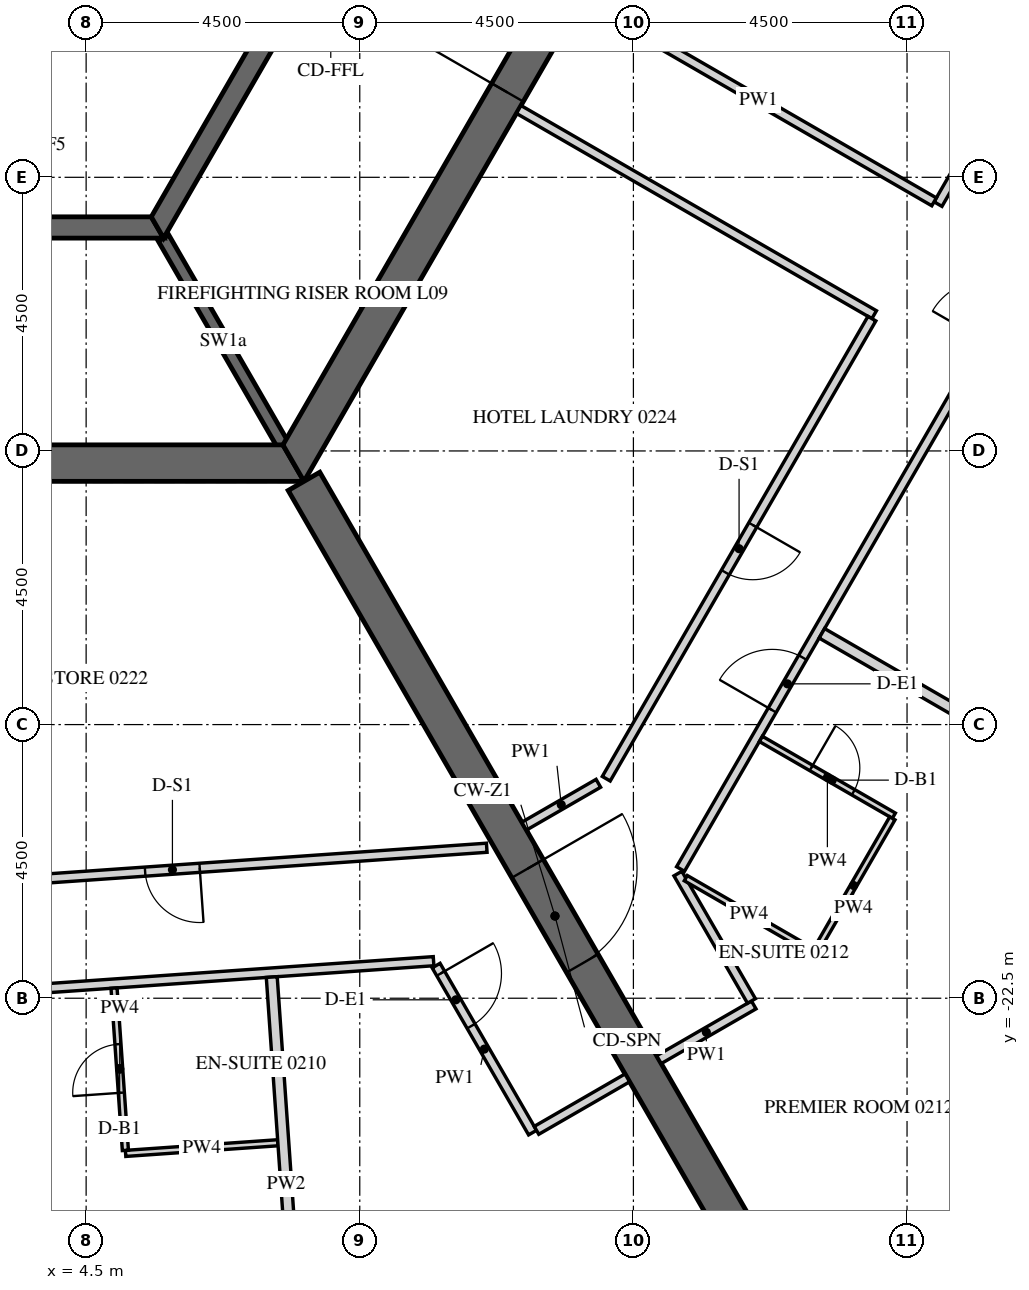
"""IFC4 building model, lengths in metres.
Left out: names, types, materials, properties, quantities, classifications, styles, units other than length and angle.
Written with IfcOpenShell. Run it as: python <this file> out.ifc"""

import sys

from ifc_helpers import new_model, si_unit, direction, frame, frame_2d, origin, place, context, subcontext, project, spatial, polyline, rectangle, outline, extrude, element, fill, save


model = new_model("IFC4")
c1 = context("Model", 3, precision=1e-05, world=origin(), true_north=direction((0.0, 1.0)))
c2 = subcontext(c1, "Body", "Model", "MODEL_VIEW")
j1 = project(units=[si_unit("LENGTHUNIT", "METRE"), si_unit("PLANEANGLEUNIT", "RADIAN")], contexts=[c1])
p1 = place(None, origin())
s1 = spatial("IfcSite", under=j1, at=p1, CompositionType="ELEMENT")
p2 = place(p1, origin())
s2 = spatial("IfcBuilding", under=s1, at=p2, CompositionType="ELEMENT")
p3 = place(p2, frame((0.0, 0.0, 49.2)))
s3 = spatial("IfcBuildingStorey", under=s2, at=p3, CompositionType="ELEMENT", Elevation=49.2)
p4 = place(p3, frame((18.83, -26.835, -0.15), z_axis=(0.0, 0.0, 1.0), x_axis=(0.500003800416, 0.866023209602, 0.0)))
e1 = element("IfcWall", 1, at=p4, inside=s3, PredefinedType="SOLIDWALL", context=c2, shape_type="SweptSolid", body=[
    extrude(outline(polyline([(-0.022, -0.275), (30.097, -0.275), (30.045, 0.275), (0.022, 0.275), (-0.022, -0.275)])), origin(), (0.0, 0.0, 1.0), 3.9),
])
p5 = place(p4, frame((1.236, 0.0, 1.05)))
e2 = element("IfcOpeningElement", 2, at=p5, cuts=e1, PredefinedType="OPENING", context=c2, shape_type="SweptSolid", body=[
    extrude(rectangle(XDim=2.4, YDim=2.4, at=frame_2d((1.2, 1.2))), frame((0.0, 0.285, 0.0), z_axis=(0.0, -1.0, 0.0), x_axis=(1.0, 0.0, 0.0)), (0.0, 0.0, 1.0), 0.57),
])
p6 = place(p4, frame((4.835, 0.0, 1.05)))
e3 = element("IfcOpeningElement", 3, at=p6, cuts=e1, PredefinedType="OPENING", context=c2, shape_type="SweptSolid", body=[
    extrude(rectangle(XDim=2.4, YDim=2.4, at=frame_2d((1.2, 1.2))), frame((0.0, 0.285, 0.0), z_axis=(0.0, -1.0, 0.0), x_axis=(1.0, 0.0, 0.0)), (0.0, 0.0, 1.0), 0.57),
])
p7 = place(p4, frame((8.436, 0.0, 1.05)))
e4 = element("IfcOpeningElement", 4, at=p7, cuts=e1, PredefinedType="OPENING", context=c2, shape_type="SweptSolid", body=[
    extrude(rectangle(XDim=2.4, YDim=2.4, at=frame_2d((1.2, 1.2))), frame((0.0, 0.285, 0.0), z_axis=(0.0, -1.0, 0.0), x_axis=(1.0, 0.0, 0.0)), (0.0, 0.0, 1.0), 0.57),
])
p8 = place(p4, frame((12.035, 0.0, 1.05)))
e5 = element("IfcOpeningElement", 5, at=p8, cuts=e1, PredefinedType="OPENING", context=c2, shape_type="SweptSolid", body=[
    extrude(rectangle(XDim=2.4, YDim=2.4, at=frame_2d((1.2, 1.2))), frame((0.0, 0.285, 0.0), z_axis=(0.0, -1.0, 0.0), x_axis=(1.0, 0.0, 0.0)), (0.0, 0.0, 1.0), 0.57),
])
p9 = place(p4, frame((15.635, 0.0, 1.05)))
e6 = element("IfcOpeningElement", 6, at=p9, cuts=e1, PredefinedType="OPENING", context=c2, shape_type="SweptSolid", body=[
    extrude(rectangle(XDim=2.4, YDim=2.4, at=frame_2d((1.2, 1.2))), frame((0.0, 0.285, 0.0), z_axis=(0.0, -1.0, 0.0), x_axis=(1.0, 0.0, 0.0)), (0.0, 0.0, 1.0), 0.57),
])
p10 = place(p4, frame((19.236, 0.0, 1.05)))
e7 = element("IfcOpeningElement", 7, at=p10, cuts=e1, PredefinedType="OPENING", context=c2, shape_type="SweptSolid", body=[
    extrude(rectangle(XDim=2.4, YDim=2.4, at=frame_2d((1.2, 1.2))), frame((0.0, 0.285, 0.0), z_axis=(0.0, -1.0, 0.0), x_axis=(1.0, 0.0, 0.0)), (0.0, 0.0, 1.0), 0.57),
])
p11 = place(p4, frame((22.835, 0.0, 1.05)))
e8 = element("IfcOpeningElement", 8, at=p11, cuts=e1, PredefinedType="OPENING", context=c2, shape_type="SweptSolid", body=[
    extrude(rectangle(XDim=2.4, YDim=2.4, at=frame_2d((1.2, 1.2))), frame((0.0, 0.285, 0.0), z_axis=(0.0, -1.0, 0.0), x_axis=(1.0, 0.0, 0.0)), (0.0, 0.0, 1.0), 0.57),
])
p12 = place(p4, frame((26.436, 0.0, 1.05)))
e9 = element("IfcOpeningElement", 9, at=p12, cuts=e1, PredefinedType="OPENING", context=c2, shape_type="SweptSolid", body=[
    extrude(rectangle(XDim=2.4, YDim=2.4, at=frame_2d((1.2, 1.2))), frame((0.0, 0.285, 0.0), z_axis=(0.0, -1.0, 0.0), x_axis=(1.0, 0.0, 0.0)), (0.0, 0.0, 1.0), 0.57),
])
p13 = place(p3, frame((-7.91, -13.7, -0.15), z_axis=(0.0, 0.0, 1.0), x_axis=(1.0, 0.0, 0.0)))
e10 = element("IfcWall", 10, at=p13, inside=s3, PredefinedType="SHEAR", context=c2, shape_type="SweptSolid", body=[
    extrude(outline(polyline([(-0.173, -0.3), (15.993, -0.3), (15.646, 0.3), (0.173, 0.3), (-0.173, -0.3)])), origin(), (0.0, 0.0, 1.0), 3.9),
])
p14 = place(p13, frame((7.31, 0.0, 0.15)))
e11 = element("IfcOpeningElement", 11, at=p14, cuts=e10, PredefinedType="OPENING", context=c2, shape_type="SweptSolid", body=[
    extrude(rectangle(XDim=1.2, YDim=2.4, at=frame_2d((0.6, 1.2))), frame((0.0, 0.31, 0.0), z_axis=(0.0, -1.0, 0.0), x_axis=(1.0, 0.0, 0.0)), (0.0, 0.0, 1.0), 0.62),
])
p15 = place(p3, frame((7.91, -13.7, -0.15), z_axis=(0.0, 0.0, 1.0), x_axis=(0.499999880136, 0.866025472988, 0.0)))
e12 = element("IfcWall", 12, at=p15, inside=s3, PredefinedType="SHEAR", context=c2, shape_type="SweptSolid", body=[
    extrude(outline(polyline([(-0.173, -0.3), (15.993, -0.3), (15.646, 0.3), (0.173, 0.3), (-0.173, -0.3)])), origin(), (0.0, 0.0, 1.0), 3.9),
])
p16 = place(p15, frame((7.039, 0.0, 0.15)))
e13 = element("IfcOpeningElement", 13, at=p16, cuts=e12, PredefinedType="OPENING", context=c2, shape_type="SweptSolid", body=[
    extrude(rectangle(XDim=1.8, YDim=2.4, at=frame_2d((0.9, 1.2))), frame((0.0, 0.31, 0.0), z_axis=(0.0, -1.0, 0.0), x_axis=(1.0, 0.0, 0.0)), (0.0, 0.0, 1.0), 0.62),
])
p17 = place(p3, frame((8.083, -14.0, -0.15), z_axis=(0.0, 0.0, 1.0), x_axis=(0.499997680643, -0.866026742862, 0.0)))
e14 = element("IfcWall", 14, at=p17, inside=s3, PredefinedType="SHEAR", context=c2, shape_type="SweptSolid", body=[
    extrude(rectangle(XDim=16.509, YDim=0.6, at=frame_2d((8.254, 0.0))), origin(), (0.0, 0.0, 1.0), 3.9),
])
p18 = place(p17, frame((7.354, 0.0, 0.15)))
e15 = element("IfcOpeningElement", 15, at=p18, cuts=e14, PredefinedType="OPENING", context=c2, shape_type="SweptSolid", body=[
    extrude(rectangle(XDim=1.8, YDim=2.4, at=frame_2d((0.9, 1.2))), frame((0.0, 0.31, 0.0), z_axis=(0.0, -1.0, 0.0), x_axis=(1.0, 0.0, 0.0)), (0.0, 0.0, 1.0), 0.62),
])
p19 = place(p3, frame((-5.673, -9.825, -0.15), z_axis=(0.0, 0.0, 1.0), x_axis=(1.0, 0.0, 0.0)))
e16 = element("IfcWall", 16, at=p19, inside=s3, PredefinedType="SHEAR", context=c2, shape_type="SweptSolid", body=[
    extrude(outline(polyline([(-0.101, -0.175), (11.446, -0.175), (11.244, 0.175), (0.101, 0.175), (-0.101, -0.175)])), origin(), (0.0, 0.0, 1.0), 3.9),
])
p20 = place(p3, frame((5.673, -9.825, -0.15), z_axis=(0.0, 0.0, 1.0), x_axis=(0.499995046907, 0.866028263435, 0.0)))
e17 = element("IfcWall", 17, at=p20, inside=s3, PredefinedType="SHEAR", context=c2, shape_type="SweptSolid", body=[
    extrude(outline(polyline([(-0.101, -0.175), (11.446, -0.175), (11.244, 0.175), (0.101, 0.175), (-0.101, -0.175)])), origin(), (0.0, 0.0, 1.0), 3.9),
])
p21 = place(p20, frame((4.801, 0.0, 0.15)))
e18 = element("IfcOpeningElement", 18, at=p21, cuts=e17, PredefinedType="OPENING", context=c2, shape_type="SweptSolid", body=[
    extrude(rectangle(XDim=1.8, YDim=2.4, at=frame_2d((0.9, 1.2))), frame((0.0, 0.185, 0.0), z_axis=(0.0, -1.0, 0.0), x_axis=(1.0, 0.0, 0.0)), (0.0, 0.0, 1.0), 0.37),
])
p22 = place(p3, frame((5.773, -10.0, -0.15), z_axis=(0.0, 0.0, 1.0), x_axis=(0.500038251005, -0.86600331843, 0.0)))
e19 = element("IfcWall", 19, at=p22, inside=s3, PredefinedType="SHEAR", context=c2, shape_type="SweptSolid", body=[
    extrude(rectangle(XDim=3.926, YDim=0.2, at=frame_2d((1.963, 0.0))), origin(), (0.0, 0.0, 1.0), 3.9),
])
p23 = place(p3, frame((-12.4, -23.472, 0.0), z_axis=(0.0, 0.0, 1.0), x_axis=(0.997564133303, 0.069755286163, 0.0)))
e20 = element("IfcWall", 20, at=p23, inside=s3, PredefinedType="PARTITIONING", context=c2, shape_type="SweptSolid", body=[
    extrude(rectangle(XDim=22.669, YDim=0.15, at=frame_2d((11.334, 0.0))), origin(), (0.0, 0.0, 1.0), 2.988),
])
p24 = place(p23, frame((3.556, 0.0, 0.0)))
e21 = element("IfcOpeningElement", 21, at=p24, cuts=e20, PredefinedType="OPENING", context=c2, shape_type="SweptSolid", body=[
    extrude(rectangle(XDim=1.0, YDim=2.1, at=frame_2d((0.5, 1.05))), frame((0.0, 0.085, 0.0), z_axis=(0.0, -1.0, 0.0), x_axis=(1.0, 0.0, 0.0)), (0.0, 0.0, 1.0), 0.17),
])
p25 = place(p23, frame((10.996, 0.0, 0.0)))
e22 = element("IfcOpeningElement", 22, at=p25, cuts=e20, PredefinedType="OPENING", context=c2, shape_type="SweptSolid", body=[
    extrude(rectangle(XDim=1.0, YDim=2.1, at=frame_2d((0.5, 1.05))), frame((0.0, 0.085, 0.0), z_axis=(0.0, -1.0, 0.0), x_axis=(1.0, 0.0, 0.0)), (0.0, 0.0, 1.0), 0.17),
])
p26 = place(p3, frame((10.256, -21.963, 0.0), z_axis=(0.0, 0.0, 1.0), x_axis=(0.499980071345, -0.866036909293, 0.0)))
e23 = element("IfcWall", 23, at=p26, inside=s3, PredefinedType="PARTITIONING", context=c2, shape_type="SweptSolid", body=[
    extrude(rectangle(XDim=3.172, YDim=0.15, at=frame_2d((1.586, 0.0))), origin(), (0.0, 0.0, 1.0), 2.988),
])
p27 = place(p26, frame((0.15, 0.0, 0.0)))
e24 = element("IfcOpeningElement", 24, at=p27, cuts=e23, PredefinedType="OPENING", context=c2, shape_type="SweptSolid", body=[
    extrude(rectangle(XDim=1.0, YDim=2.1, at=frame_2d((0.5, 1.05))), frame((0.0, 0.085, 0.0), z_axis=(0.0, -1.0, 0.0), x_axis=(1.0, 0.0, 0.0)), (0.0, 0.0, 1.0), 0.17),
])
p28 = place(p3, frame((11.906, -24.673, 0.0), z_axis=(0.0, 0.0, 1.0), x_axis=(0.866013532718, 0.500020560727, 0.0)))
e25 = element("IfcWall", 25, at=p28, inside=s3, PredefinedType="PARTITIONING", context=c2, shape_type="SweptSolid", body=[
    extrude(rectangle(XDim=1.725, YDim=0.15, at=frame_2d((0.863, 0.0))), origin(), (0.0, 0.0, 1.0), 2.988),
])
p29 = place(p3, frame((11.088, -20.025, 0.0), z_axis=(0.0, 0.0, 1.0), x_axis=(-0.997564133621, -0.069755281607, 0.0)))
e26 = element("IfcWall", 26, at=p29, inside=s3, PredefinedType="PARTITIONING", context=c2, shape_type="SweptSolid", body=[
    extrude(rectangle(XDim=10.363, YDim=0.15, at=frame_2d((5.182, 0.0))), origin(), (0.0, 0.0, 1.0), 2.988),
])
p30 = place(p29, frame((4.732, 0.0, 0.0)))
e27 = element("IfcOpeningElement", 27, at=p30, cuts=e26, PredefinedType="OPENING", context=c2, shape_type="SweptSolid", body=[
    extrude(rectangle(XDim=0.9, YDim=2.1, at=frame_2d((0.45, 1.05))), frame((0.0, 0.085, 0.0), z_axis=(0.0, -1.0, 0.0), x_axis=(1.0, 0.0, 0.0)), (0.0, 0.0, 1.0), 0.17),
])
p31 = place(p3, frame((13.92, -23.51, 0.0), z_axis=(0.0, 0.0, 1.0), x_axis=(0.866047807691, 0.499961193289, 0.0)))
e28 = element("IfcWall", 28, at=p31, inside=s3, PredefinedType="PARTITIONING", context=c2, shape_type="SweptSolid", body=[
    extrude(rectangle(XDim=1.8, YDim=0.15, at=frame_2d((0.9, 0.0))), origin(), (0.0, 0.0, 1.0), 2.988),
])
p32 = place(p3, frame((15.441, -22.545, 0.0), z_axis=(0.0, 0.0, 1.0), x_axis=(-0.500013622142, 0.866017538894, 0.0)))
e29 = element("IfcWall", 29, at=p32, inside=s3, PredefinedType="PARTITIONING", context=c2, shape_type="SweptSolid", body=[
    extrude(rectangle(XDim=2.419, YDim=0.15, at=frame_2d((1.21, 0.0))), origin(), (0.0, 0.0, 1.0), 2.988),
])
p33 = place(p3, frame((14.275, -20.375, 0.0), z_axis=(0.0, 0.0, 1.0), x_axis=(0.500001098408, 0.866024769617, 0.0)))
e30 = element("IfcWall", 30, at=p33, inside=s3, PredefinedType="PARTITIONING", context=c2, shape_type="SweptSolid", body=[
    extrude(rectangle(XDim=24.599, YDim=0.15, at=frame_2d((12.299, 0.0))), origin(), (0.0, 0.0, 1.0), 2.988),
])
p34 = place(p33, frame((3.016, 0.0, 0.0)))
e31 = element("IfcOpeningElement", 31, at=p34, cuts=e30, PredefinedType="OPENING", context=c2, shape_type="SweptSolid", body=[
    extrude(rectangle(XDim=1.0, YDim=2.1, at=frame_2d((0.5, 1.05))), frame((0.0, 0.085, 0.0), z_axis=(0.0, -1.0, 0.0), x_axis=(1.0, 0.0, 0.0)), (0.0, 0.0, 1.0), 0.17),
])
p35 = place(p33, frame((10.019, 0.0, 0.0)))
e32 = element("IfcOpeningElement", 32, at=p35, cuts=e30, PredefinedType="OPENING", context=c2, shape_type="SweptSolid", body=[
    extrude(rectangle(XDim=1.0, YDim=2.1, at=frame_2d((0.5, 1.05))), frame((0.0, 0.085, 0.0), z_axis=(0.0, -1.0, 0.0), x_axis=(1.0, 0.0, 0.0)), (0.0, 0.0, 1.0), 0.17),
])
p36 = place(p33, frame((22.459, 0.0, 0.0)))
e33 = element("IfcOpeningElement", 33, at=p36, cuts=e30, PredefinedType="OPENING", context=c2, shape_type="SweptSolid", body=[
    extrude(rectangle(XDim=1.0, YDim=2.1, at=frame_2d((0.5, 1.05))), frame((0.0, 0.085, 0.0), z_axis=(0.0, -1.0, 0.0), x_axis=(1.0, 0.0, 0.0)), (0.0, 0.0, 1.0), 0.17),
])
p37 = place(p3, frame((24.411, 0.782, 0.0), z_axis=(0.0, 0.0, 1.0), x_axis=(-0.499996383721, -0.866027491634, 0.0)))
e34 = element("IfcWall", 34, at=p37, inside=s3, PredefinedType="PARTITIONING", context=c2, shape_type="SweptSolid", body=[
    extrude(rectangle(XDim=11.804, YDim=0.15, at=frame_2d((5.902, 0.0))), origin(), (0.0, 0.0, 1.0), 2.988),
])
p38 = place(p37, frame((5.452, 0.0, 0.0)))
e35 = element("IfcOpeningElement", 35, at=p38, cuts=e34, PredefinedType="OPENING", context=c2, shape_type="SweptSolid", body=[
    extrude(rectangle(XDim=0.9, YDim=2.1, at=frame_2d((0.45, 1.05))), frame((0.0, 0.085, 0.0), z_axis=(0.0, -1.0, 0.0), x_axis=(1.0, 0.0, 0.0)), (0.0, 0.0, 1.0), 0.17),
])
p39 = place(p3, frame((18.445, -9.403, 0.0), z_axis=(0.0, 0.0, 1.0), x_axis=(-0.866033317326, 0.499986293093, 0.0)))
e36 = element("IfcWall", 36, at=p39, inside=s3, PredefinedType="PARTITIONING", context=c2, shape_type="SweptSolid", body=[
    extrude(rectangle(XDim=6.675, YDim=0.15, at=frame_2d((3.337, 0.0))), origin(), (0.0, 0.0, 1.0), 2.988),
])
p40 = place(p3, frame((11.614, -7.884, 0.0), z_axis=(0.0, 0.0, 1.0), x_axis=(0.866026575979, -0.499997969693, 0.0)))
e37 = element("IfcWall", 37, at=p40, inside=s3, PredefinedType="PARTITIONING", context=c2, shape_type="SweptSolid", body=[
    extrude(rectangle(XDim=6.75, YDim=0.15, at=frame_2d((3.375, 0.0))), origin(), (0.0, 0.0, 1.0), 2.988),
])
p41 = place(p3, frame((17.422, -11.324, 0.0), z_axis=(0.0, 0.0, 1.0), x_axis=(-0.499994979726, -0.866028302222, 0.0)))
e38 = element("IfcWall", 38, at=p41, inside=s3, PredefinedType="PARTITIONING", context=c2, shape_type="SweptSolid", body=[
    extrude(rectangle(XDim=8.737, YDim=0.15, at=frame_2d((4.368, 0.0))), origin(), (0.0, 0.0, 1.0), 2.988),
])
p42 = place(p41, frame((3.918, 0.0, 0.0)))
e39 = element("IfcOpeningElement", 39, at=p42, cuts=e38, PredefinedType="OPENING", context=c2, shape_type="SweptSolid", body=[
    extrude(rectangle(XDim=0.9, YDim=2.1, at=frame_2d((0.45, 1.05))), frame((0.0, 0.085, 0.0), z_axis=(0.0, -1.0, 0.0), x_axis=(1.0, 0.0, 0.0)), (0.0, 0.0, 1.0), 0.17),
])
p43 = place(p3, frame((12.924, -18.966, 0.0), z_axis=(0.0, 0.0, 1.0), x_axis=(-0.866038455972, -0.499977392266, 0.0)))
e40 = element("IfcWall", 40, at=p43, inside=s3, PredefinedType="PARTITIONING", context=c2, shape_type="SweptSolid", body=[
    extrude(rectangle(XDim=1.409, YDim=0.15, at=frame_2d((0.705, 0.0))), origin(), (0.0, 0.0, 1.0), 2.988),
])
p44 = place(p3, frame((7.653, -24.877, 0.0), z_axis=(0.0, 0.0, 1.0), x_axis=(-0.997565196586, -0.069740078583, 0.0)))
e41 = element("IfcWall", 41, at=p44, inside=s3, PredefinedType="PARTITIONING", context=c2, shape_type="SweptSolid", body=[
    extrude(rectangle(XDim=2.51, YDim=0.1, at=frame_2d((1.255, 0.0))), origin(), (0.0, 0.0, 1.0), 2.988),
])
p45 = place(p3, frame((5.146, -25.002, 0.0), z_axis=(0.0, 0.0, 1.0), x_axis=(-0.069729221413, 0.997565955554, 0.0)))
e42 = element("IfcWall", 42, at=p45, inside=s3, PredefinedType="PARTITIONING", context=c2, shape_type="SweptSolid", body=[
    extrude(rectangle(XDim=2.675, YDim=0.1, at=frame_2d((1.337, 0.0))), origin(), (0.0, 0.0, 1.0), 2.988),
])
p46 = place(p45, frame((0.95, 0.0, 0.0)))
e43 = element("IfcOpeningElement", 43, at=p46, cuts=e42, PredefinedType="OPENING", context=c2, shape_type="SweptSolid", body=[
    extrude(rectangle(XDim=0.8, YDim=2.1, at=frame_2d((0.4, 1.05))), frame((0.0, 0.06, 0.0), z_axis=(0.0, -1.0, 0.0), x_axis=(1.0, 0.0, 0.0)), (0.0, 0.0, 1.0), 0.12),
])
p47 = place(p3, frame((8.029, -28.96, 0.0), z_axis=(0.0, 0.0, 1.0), x_axis=(-0.069754729296, 0.997564172242, 0.0)))
e44 = element("IfcWall", 44, at=p47, inside=s3, PredefinedType="PARTITIONING", context=c2, shape_type="SweptSolid", body=[
    extrude(rectangle(XDim=6.825, YDim=0.18, at=frame_2d((3.413, 0.0))), origin(), (0.0, 0.0, 1.0), 2.988),
])
p48 = place(p3, frame((15.597, -18.236, 0.0), z_axis=(0.0, 0.0, 1.0), x_axis=(0.866039067339, -0.499976333282, 0.0)))
e45 = element("IfcWall", 45, at=p48, inside=s3, PredefinedType="PARTITIONING", context=c2, shape_type="SweptSolid", body=[
    extrude(rectangle(XDim=2.525, YDim=0.1, at=frame_2d((1.262, 0.0))), origin(), (0.0, 0.0, 1.0), 2.988),
])
p49 = place(p48, frame((0.955, 0.0, 0.0)))
e46 = element("IfcOpeningElement", 46, at=p49, cuts=e45, PredefinedType="OPENING", context=c2, shape_type="SweptSolid", body=[
    extrude(rectangle(XDim=0.8, YDim=2.1, at=frame_2d((0.4, 1.05))), frame((0.0, 0.06, 0.0), z_axis=(0.0, -1.0, 0.0), x_axis=(1.0, 0.0, 0.0)), (0.0, 0.0, 1.0), 0.12),
])
p50 = place(p3, frame((17.758, -19.542, 0.0), z_axis=(0.0, 0.0, 1.0), x_axis=(-0.499990435942, -0.866030925526, 0.0)))
e47 = element("IfcWall", 47, at=p50, inside=s3, PredefinedType="PARTITIONING", context=c2, shape_type="SweptSolid", body=[
    extrude(rectangle(XDim=2.55, YDim=0.1, at=frame_2d((1.275, 0.0))), origin(), (0.0, 0.0, 1.0), 2.988),
])
p51 = place(p3, frame((16.44, -21.725, 0.0), z_axis=(0.0, 0.0, 1.0), x_axis=(-0.865980596518, 0.500077600433, 0.0)))
e48 = element("IfcWall", 48, at=p51, inside=s3, PredefinedType="PARTITIONING", context=c2, shape_type="SweptSolid", body=[
    extrude(rectangle(XDim=2.4, YDim=0.1, at=frame_2d((1.2, 0.0))), origin(), (0.0, 0.0, 1.0), 2.988),
])
p52 = place(p3, frame((22.51, -19.912, 0.0), z_axis=(0.0, 0.0, 1.0), x_axis=(-0.866019982719, 0.500009389444, 0.0)))
e49 = element("IfcWall", 49, at=p52, inside=s3, PredefinedType="PARTITIONING", context=c2, shape_type="SweptSolid", body=[
    extrude(rectangle(XDim=6.825, YDim=0.18, at=frame_2d((3.413, 0.0))), origin(), (0.0, 0.0, 1.0), 2.988),
])
p53 = place(p16, origin())
e50 = element("IfcDoor", 50, at=p53, inside=s3, OperationType="DOUBLE_DOOR_SINGLE_SWING", PredefinedType="DOOR", context=c2, shape_type="SweptSolid", body=[
    extrude(rectangle(XDim=1.8, YDim=2.4, at=frame_2d((0.9, 1.2))), frame((0.0, 0.025, 0.0), z_axis=(0.0, -1.0, 0.0), x_axis=(1.0, 0.0, 0.0)), (0.0, 0.0, 1.0), 0.05),
])
fill(e13, e50)
p54 = place(p18, origin())
e51 = element("IfcDoor", 51, at=p54, inside=s3, OperationType="DOUBLE_DOOR_SINGLE_SWING", PredefinedType="DOOR", context=c2, shape_type="SweptSolid", body=[
    extrude(rectangle(XDim=1.8, YDim=2.4, at=frame_2d((0.9, 1.2))), frame((0.0, 0.025, 0.0), z_axis=(0.0, -1.0, 0.0), x_axis=(1.0, 0.0, 0.0)), (0.0, 0.0, 1.0), 0.05),
])
fill(e15, e51)
p55 = place(p46, origin())
e52 = element("IfcDoor", 52, at=p55, inside=s3, OperationType="SINGLE_SWING_RIGHT", PredefinedType="DOOR", context=c2, shape_type="SweptSolid", body=[
    extrude(rectangle(XDim=0.8, YDim=2.1, at=frame_2d((0.4, 1.05))), frame((0.0, 0.025, 0.0), z_axis=(0.0, -1.0, 0.0), x_axis=(1.0, 0.0, 0.0)), (0.0, 0.0, 1.0), 0.05),
])
fill(e43, e52)
p56 = place(p27, origin())
e53 = element("IfcDoor", 53, at=p56, inside=s3, OperationType="SINGLE_SWING_RIGHT", PredefinedType="DOOR", context=c2, shape_type="SweptSolid", body=[
    extrude(rectangle(XDim=1.0, YDim=2.1, at=frame_2d((0.5, 1.05))), frame((0.0, 0.025, 0.0), z_axis=(0.0, -1.0, 0.0), x_axis=(1.0, 0.0, 0.0)), (0.0, 0.0, 1.0), 0.05),
])
fill(e24, e53)
p57 = place(p34, origin())
e54 = element("IfcDoor", 54, at=p57, inside=s3, OperationType="SINGLE_SWING_RIGHT", PredefinedType="DOOR", context=c2, shape_type="SweptSolid", body=[
    extrude(rectangle(XDim=1.0, YDim=2.1, at=frame_2d((0.5, 1.05))), frame((0.0, 0.025, 0.0), z_axis=(0.0, -1.0, 0.0), x_axis=(1.0, 0.0, 0.0)), (0.0, 0.0, 1.0), 0.05),
])
fill(e31, e54)
p58 = place(p49, origin())
e55 = element("IfcDoor", 55, at=p58, inside=s3, OperationType="SINGLE_SWING_LEFT", PredefinedType="DOOR", context=c2, shape_type="SweptSolid", body=[
    extrude(rectangle(XDim=0.8, YDim=2.1, at=frame_2d((0.4, 1.05))), frame((0.0, 0.025, 0.0), z_axis=(0.0, -1.0, 0.0), x_axis=(1.0, 0.0, 0.0)), (0.0, 0.0, 1.0), 0.05),
])
fill(e46, e55)
p59 = place(p30, origin())
e56 = element("IfcDoor", 56, at=p59, inside=s3, OperationType="SINGLE_SWING_LEFT", PredefinedType="DOOR", context=c2, shape_type="SweptSolid", body=[
    extrude(rectangle(XDim=0.9, YDim=2.1, at=frame_2d((0.45, 1.05))), frame((0.0, 0.025, 0.0), z_axis=(0.0, -1.0, 0.0), x_axis=(1.0, 0.0, 0.0)), (0.0, 0.0, 1.0), 0.05),
])
fill(e27, e56)
p60 = place(p42, origin())
e57 = element("IfcDoor", 57, at=p60, inside=s3, OperationType="SINGLE_SWING_LEFT", PredefinedType="DOOR", context=c2, shape_type="SweptSolid", body=[
    extrude(rectangle(XDim=0.9, YDim=2.1, at=frame_2d((0.45, 1.05))), frame((0.0, 0.025, 0.0), z_axis=(0.0, -1.0, 0.0), x_axis=(1.0, 0.0, 0.0)), (0.0, 0.0, 1.0), 0.05),
])
fill(e39, e57)
save(model, sys.argv[1])
